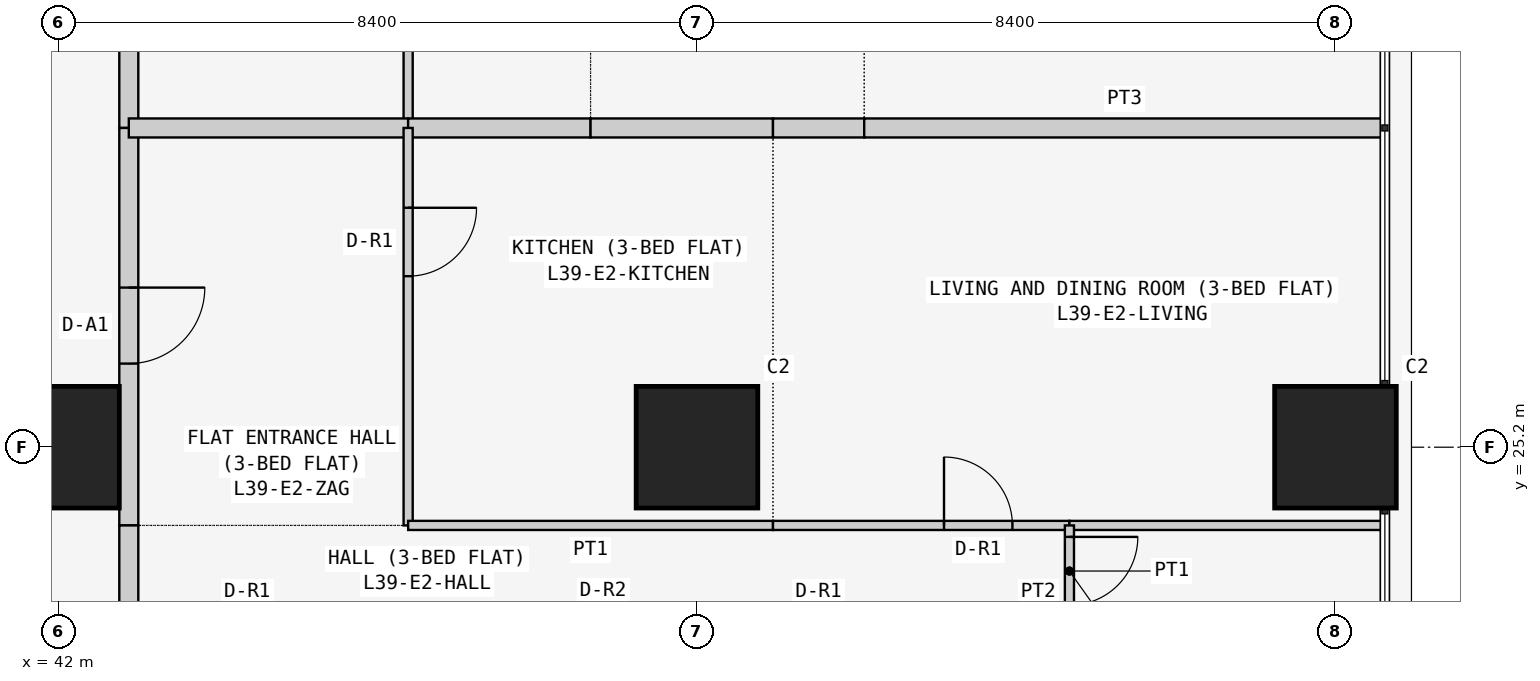
"""IFC4 building model, lengths in metres.
Left out: names, types, materials, properties, quantities, classifications, styles, units other than length and angle.
Written with IfcOpenShell. Run it as: python <this file> out.ifc"""

import sys

from ifc_helpers import new_model, si_unit, direction, frame, frame_2d, origin, origin_2d, place, context, subcontext, project, spatial, rectangle, extrude, element, fill, save


model = new_model("IFC4")
c1 = context("Model", 3, precision=1e-05, world=origin(), true_north=direction((0.0, 1.0)))
c2 = subcontext(c1, "Body", "Model", "MODEL_VIEW")
j1 = project(units=[si_unit("LENGTHUNIT", "METRE"), si_unit("PLANEANGLEUNIT", "RADIAN")], contexts=[c1])
p1 = place(None, origin())
s1 = spatial("IfcSite", under=j1, at=p1, CompositionType="ELEMENT")
p2 = place(p1, origin())
s2 = spatial("IfcBuilding", under=s1, at=p2, CompositionType="ELEMENT")
p3 = place(p2, frame((0.0, 0.0, 152.1)))
s3 = spatial("IfcBuildingStorey", under=s2, at=p3, CompositionType="ELEMENT", Elevation=152.1)
for number, where, z_axis, x_axis in (
    (1, (42.0, 25.2, 0.0), (0.0, 0.0, 1.0), (1.0, 0.0, 0.0)),
    (2, (50.4, 25.2, 0.0), (0.0, 0.0, 1.0), (1.0, 0.0, 0.0)),
    (3, (58.8, 25.2, 0.0), (0.0, 0.0, 1.0), (1.0, 0.0, 0.0)),
):
    element("IfcColumn", number, at=place(p3, frame(where, z_axis=z_axis, x_axis=x_axis)), inside=s3, PredefinedType="COLUMN", context=c2, shape_type="SweptSolid", body=[
        extrude(rectangle(XDim=1.6, YDim=1.6, at=origin_2d()), origin(), (0.0, 0.0, 1.0), 3.6),
    ])
p4 = place(p3, frame((42.925, 34.629, 0.0), z_axis=(0.0, 0.0, 1.0), x_axis=(0.0, -1.0, 0.0)))
e4 = element("IfcWall", 4, at=p4, inside=s3, PredefinedType="PARTITIONING", context=c2, shape_type="SweptSolid", body=[
    extrude(rectangle(XDim=5.229, YDim=0.25, at=frame_2d((2.615, 0.0))), origin(), (0.0, 0.0, 1.0), 3.45),
])
p5 = place(p4, frame((2.129, 0.0, 0.0)))
e5 = element("IfcOpeningElement", 5, at=p5, cuts=e4, PredefinedType="OPENING", context=c2, shape_type="SweptSolid", body=[
    extrude(rectangle(XDim=1.0, YDim=2.1, at=frame_2d((0.5, 1.05))), frame((0.0, 0.135, 0.0), z_axis=(0.0, -1.0, 0.0), x_axis=(1.0, 0.0, 0.0)), (0.0, 0.0, 1.0), 0.27),
])
p6 = place(p3, frame((42.925, 29.4, 0.0), z_axis=(0.0, 0.0, 1.0), x_axis=(0.0, -1.0, 0.0)))
e6 = element("IfcWall", 6, at=p6, inside=s3, PredefinedType="PARTITIONING", context=c2, shape_type="SweptSolid", body=[
    extrude(rectangle(XDim=5.229, YDim=0.25, at=frame_2d((2.615, 0.0))), origin(), (0.0, 0.0, 1.0), 3.45),
])
p7 = place(p6, frame((2.1, 0.0, 0.0)))
e7 = element("IfcOpeningElement", 7, at=p7, cuts=e6, PredefinedType="OPENING", context=c2, shape_type="SweptSolid", body=[
    extrude(rectangle(XDim=1.0, YDim=2.1, at=frame_2d((0.5, 1.05))), frame((0.0, 0.135, 0.0), z_axis=(0.0, -1.0, 0.0), x_axis=(1.0, 0.0, 0.0)), (0.0, 0.0, 1.0), 0.27),
])
p8 = place(p3, frame((42.925, 24.171, 0.0), z_axis=(0.0, 0.0, 1.0), x_axis=(0.0, -1.0, 0.0)))
e8 = element("IfcWall", 8, at=p8, inside=s3, PredefinedType="PARTITIONING", context=c2, shape_type="SweptSolid", body=[
    extrude(rectangle(XDim=1.2, YDim=0.25, at=frame_2d((0.6, 0.0))), origin(), (0.0, 0.0, 1.0), 3.45),
])
p9 = place(p3, frame((46.6, 29.4, 0.0), z_axis=(0.0, 0.0, 1.0), x_axis=(0.0, 1.0, 0.0)))
e9 = element("IfcWall", 9, at=p9, inside=s3, PredefinedType="PARTITIONING", context=c2, shape_type="SweptSolid", body=[
    extrude(rectangle(XDim=5.229, YDim=0.12, at=frame_2d((2.615, 0.0))), origin(), (0.0, 0.0, 1.0), 3.45),
])
p10 = place(p3, frame((42.925, 29.4, 0.0), z_axis=(0.0, 0.0, 1.0), x_axis=(1.0, 0.0, 0.0)))
e10 = element("IfcWall", 10, at=p10, inside=s3, PredefinedType="PARTITIONING", context=c2, shape_type="SweptSolid", body=[
    extrude(rectangle(XDim=3.675, YDim=0.25, at=frame_2d((1.837, 0.0))), origin(), (0.0, 0.0, 1.0), 3.45),
])
for number, where, z_axis, x_axis in (
    (11, (46.6, 29.4, 0.0), (0.0, 0.0, 1.0), (1.0, 0.0, 0.0)),
    (12, (49.0, 29.4, 0.0), (0.0, 0.0, 1.0), (1.0, 0.0, 0.0)),
):
    element("IfcWall", number, at=place(p3, frame(where, z_axis=z_axis, x_axis=x_axis)), inside=s3, PredefinedType="PARTITIONING", context=c2, shape_type="SweptSolid", body=[
        extrude(rectangle(XDim=2.4, YDim=0.25, at=frame_2d((1.2, 0.0))), origin(), (0.0, 0.0, 1.0), 3.45),
    ])
p11 = place(p3, frame((51.4, 29.4, 0.0), z_axis=(0.0, 0.0, 1.0), x_axis=(1.0, 0.0, 0.0)))
e13 = element("IfcWall", 13, at=p11, inside=s3, PredefinedType="PARTITIONING", context=c2, shape_type="SweptSolid", body=[
    extrude(rectangle(XDim=1.2, YDim=0.25, at=frame_2d((0.6, 0.0))), origin(), (0.0, 0.0, 1.0), 3.45),
])
p12 = place(p3, frame((52.6, 29.4, 0.0), z_axis=(0.0, 0.0, 1.0), x_axis=(1.0, 0.0, 0.0)))
e14 = element("IfcWall", 14, at=p12, inside=s3, PredefinedType="PARTITIONING", context=c2, shape_type="SweptSolid", body=[
    extrude(rectangle(XDim=6.85, YDim=0.25, at=frame_2d((3.425, 0.0))), origin(), (0.0, 0.0, 1.0), 3.45),
])
p13 = place(p3, frame((46.6, 29.4, 0.0), z_axis=(0.0, 0.0, 1.0), x_axis=(0.0, -1.0, 0.0)))
e15 = element("IfcWall", 15, at=p13, inside=s3, PredefinedType="PARTITIONING", context=c2, shape_type="SweptSolid", body=[
    extrude(rectangle(XDim=5.229, YDim=0.12, at=frame_2d((2.615, 0.0))), origin(), (0.0, 0.0, 1.0), 3.45),
])
p14 = place(p13, frame((1.05, 0.0, 0.0)))
e16 = element("IfcOpeningElement", 16, at=p14, cuts=e15, PredefinedType="OPENING", context=c2, shape_type="SweptSolid", body=[
    extrude(rectangle(XDim=0.9, YDim=2.1, at=frame_2d((0.45, 1.05))), frame((0.0, 0.07, 0.0), z_axis=(0.0, -1.0, 0.0), x_axis=(1.0, 0.0, 0.0)), (0.0, 0.0, 1.0), 0.14),
])
p15 = place(p3, frame((51.4, 24.171, 0.0), z_axis=(0.0, 0.0, 1.0), x_axis=(-1.0, 0.0, 0.0)))
e17 = element("IfcWall", 17, at=p15, inside=s3, PredefinedType="PARTITIONING", context=c2, shape_type="SweptSolid", body=[
    extrude(rectangle(XDim=4.8, YDim=0.12, at=frame_2d((2.4, 0.0))), origin(), (0.0, 0.0, 1.0), 3.45),
])
p16 = place(p3, frame((55.3, 24.171, 0.0), z_axis=(0.0, 0.0, 1.0), x_axis=(-1.0, 0.0, 0.0)))
e18 = element("IfcWall", 18, at=p16, inside=s3, PredefinedType="PARTITIONING", context=c2, shape_type="SweptSolid", body=[
    extrude(rectangle(XDim=3.9, YDim=0.12, at=frame_2d((1.95, 0.0))), origin(), (0.0, 0.0, 1.0), 3.45),
])
p17 = place(p16, frame((0.75, 0.0, 0.0)))
e19 = element("IfcOpeningElement", 19, at=p17, cuts=e18, PredefinedType="OPENING", context=c2, shape_type="SweptSolid", body=[
    extrude(rectangle(XDim=0.9, YDim=2.1, at=frame_2d((0.45, 1.05))), frame((0.0, 0.07, 0.0), z_axis=(0.0, -1.0, 0.0), x_axis=(1.0, 0.0, 0.0)), (0.0, 0.0, 1.0), 0.14),
])
p18 = place(p3, frame((59.45, 24.171, 0.0), z_axis=(0.0, 0.0, 1.0), x_axis=(-1.0, 0.0, 0.0)))
e20 = element("IfcWall", 20, at=p18, inside=s3, PredefinedType="PARTITIONING", context=c2, shape_type="SweptSolid", body=[
    extrude(rectangle(XDim=4.15, YDim=0.12, at=frame_2d((2.075, 0.0))), origin(), (0.0, 0.0, 1.0), 3.45),
])
p19 = place(p3, frame((55.3, 24.171, 0.0), z_axis=(0.0, 0.0, 1.0), x_axis=(0.0, -1.0, 0.0)))
e21 = element("IfcWall", 21, at=p19, inside=s3, PredefinedType="PARTITIONING", context=c2, shape_type="SweptSolid", body=[
    extrude(rectangle(XDim=1.2, YDim=0.12, at=frame_2d((0.6, 0.0))), origin(), (0.0, 0.0, 1.0), 3.45),
])
p20 = place(p19, frame((0.151, 0.0, 0.0)))
e22 = element("IfcOpeningElement", 22, at=p20, cuts=e21, PredefinedType="OPENING", context=c2, shape_type="SweptSolid", body=[
    extrude(rectangle(XDim=0.9, YDim=2.1, at=frame_2d((0.45, 1.05))), frame((0.0, 0.07, 0.0), z_axis=(0.0, -1.0, 0.0), x_axis=(1.0, 0.0, 0.0)), (0.0, 0.0, 1.0), 0.14),
])
p21 = place(p7, origin())
e23 = element("IfcDoor", 23, at=p21, inside=s3, OperationType="SINGLE_SWING_LEFT", PredefinedType="DOOR", context=c2, shape_type="SweptSolid", body=[
    extrude(rectangle(XDim=1.0, YDim=2.1, at=frame_2d((0.5, 1.05))), frame((0.0, 0.025, 0.0), z_axis=(0.0, -1.0, 0.0), x_axis=(1.0, 0.0, 0.0)), (0.0, 0.0, 1.0), 0.05),
])
fill(e7, e23)
p22 = place(p14, origin())
e24 = element("IfcDoor", 24, at=p22, inside=s3, OperationType="SINGLE_SWING_LEFT", PredefinedType="DOOR", context=c2, shape_type="SweptSolid", body=[
    extrude(rectangle(XDim=0.9, YDim=2.1, at=frame_2d((0.45, 1.05))), frame((0.0, 0.025, 0.0), z_axis=(0.0, -1.0, 0.0), x_axis=(1.0, 0.0, 0.0)), (0.0, 0.0, 1.0), 0.05),
])
fill(e16, e24)
p23 = place(p17, frame((0.9, 0.0, 0.0), z_axis=(0.0, 0.0, 1.0), x_axis=(-1.0, 0.0, 0.0)))
e25 = element("IfcDoor", 25, at=p23, inside=s3, OperationType="SINGLE_SWING_LEFT", PredefinedType="DOOR", context=c2, shape_type="SweptSolid", body=[
    extrude(rectangle(XDim=0.9, YDim=2.1, at=frame_2d((0.45, 1.05))), frame((0.0, 0.025, 0.0), z_axis=(0.0, -1.0, 0.0), x_axis=(1.0, 0.0, 0.0)), (0.0, 0.0, 1.0), 0.05),
])
fill(e19, e25)
p24 = place(p20, origin())
e26 = element("IfcDoor", 26, at=p24, inside=s3, OperationType="SINGLE_SWING_LEFT", PredefinedType="DOOR", context=c2, shape_type="SweptSolid", body=[
    extrude(rectangle(XDim=0.9, YDim=2.1, at=frame_2d((0.45, 1.05))), frame((0.0, 0.025, 0.0), z_axis=(0.0, -1.0, 0.0), x_axis=(1.0, 0.0, 0.0)), (0.0, 0.0, 1.0), 0.05),
])
fill(e22, e26)
save(model, sys.argv[1])
